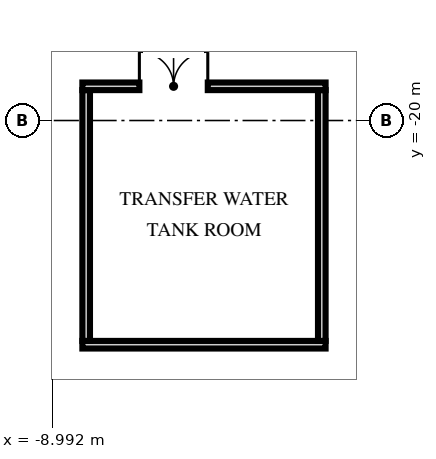
"""IFC4 building model, lengths in metres.
Left out: names, types, materials, properties, quantities, classifications, styles, units other than length and angle.
Written with IfcOpenShell. Run it as: python <this file> out.ifc"""

import sys

from ifc_helpers import new_model, si_unit, direction, frame, frame_2d, origin, origin_2d, place, context, subcontext, project, spatial, rectangle, hollow_rectangle, extrude, element, fill, save


model = new_model("IFC4")
c1 = context("Model", 3, precision=1e-05, world=origin(), true_north=direction((0.0, 1.0)))
c2 = subcontext(c1, "Body", "Model", "MODEL_VIEW")
j1 = project(units=[si_unit("LENGTHUNIT", "METRE"), si_unit("PLANEANGLEUNIT", "RADIAN")], contexts=[c1])
p1 = place(None, origin())
s1 = spatial("IfcSite", under=j1, at=p1, CompositionType="ELEMENT")
p2 = place(p1, origin())
s2 = spatial("IfcBuilding", under=s1, at=p2, CompositionType="ELEMENT")
p3 = place(p2, frame((0.0, 0.0, 99.75)))
s3 = spatial("IfcBuildingStorey", under=s2, at=p3, CompositionType="ELEMENT", Elevation=99.75)
p4 = place(p3, frame((0.0, -29.8, -0.65), z_axis=(0.0, 0.334765406017, 0.942301503201), x_axis=(1.0, 0.0, 0.0)))
e1 = element("IfcColumn", 1, at=p4, inside=s3, PredefinedType="COLUMN", context=c2, shape_type="SweptSolid", body=[
    extrude(hollow_rectangle(XDim=3.2, YDim=1.8, WallThickness=0.2, at=origin_2d()), origin(), (0.0, 0.0, 1.0), 8.065),
])
p5 = place(p3, frame((-10.0, -29.8, -0.65), z_axis=(0.103601510687, 0.332963994967, 0.937230870724), x_axis=(0.994618884766, -0.034712905596, -0.097612951251)))
e2 = element("IfcColumn", 2, at=p5, inside=s3, PredefinedType="COLUMN", context=c2, shape_type="SweptSolid", body=[
    extrude(hollow_rectangle(XDim=3.2, YDim=1.8, WallThickness=0.2, at=origin_2d()), origin(), (0.0, 0.0, 1.0), 8.109),
])
p6 = place(p3, frame((-8.2, -25.9, 0.0), z_axis=(0.0, 0.0, 1.0), x_axis=(1.0, 0.0, 0.0)))
e3 = element("IfcWall", 3, at=p6, inside=s3, PredefinedType="SOLIDWALL", context=c2, shape_type="SweptSolid", body=[
    extrude(rectangle(XDim=6.4, YDim=0.2, at=frame_2d((3.2, 0.0))), origin(), (0.0, 0.0, 1.0), 6.46),
])
for number, where, z_axis, x_axis in (
    (4, (-8.1, -25.8, 0.0), (0.0, 0.0, 1.0), (0.0, 1.0, 0.0)),
    (5, (-1.9, -25.8, 0.0), (0.0, 0.0, 1.0), (0.0, 1.0, 0.0)),
):
    element("IfcWall", number, at=place(p3, frame(where, z_axis=z_axis, x_axis=x_axis)), inside=s3, PredefinedType="SOLIDWALL", context=c2, shape_type="SweptSolid", body=[
        extrude(rectangle(XDim=6.6, YDim=0.2, at=frame_2d((3.3, 0.0))), origin(), (0.0, 0.0, 1.0), 7.25),
    ])
p7 = place(p3, frame((-8.2, -19.1, 0.0), z_axis=(0.0, 0.0, 1.0), x_axis=(1.0, 0.0, 0.0)))
e6 = element("IfcWall", 6, at=p7, inside=s3, PredefinedType="SOLIDWALL", context=c2, shape_type="SweptSolid", body=[
    extrude(rectangle(XDim=6.4, YDim=0.2, at=frame_2d((3.2, 0.0))), origin(), (0.0, 0.0, 1.0), 6.46),
])
p8 = place(p7, frame((1.5, 0.0, 0.0)))
e7 = element("IfcOpeningElement", 7, at=p8, cuts=e6, PredefinedType="OPENING", context=c2, shape_type="SweptSolid", body=[
    extrude(rectangle(XDim=1.8, YDim=2.4, at=frame_2d((0.9, 1.2))), frame((0.0, 0.11, 0.0), z_axis=(0.0, -1.0, 0.0), x_axis=(1.0, 0.0, 0.0)), (0.0, 0.0, 1.0), 0.22),
])
p9 = place(p8, origin())
e8 = element("IfcDoor", 8, at=p9, inside=s3, OperationType="DOUBLE_DOOR_SINGLE_SWING", PredefinedType="DOOR", context=c2, shape_type="SweptSolid", body=[
    extrude(rectangle(XDim=1.8, YDim=2.4, at=frame_2d((0.9, 1.2))), frame((0.0, 0.025, 0.0), z_axis=(0.0, -1.0, 0.0), x_axis=(1.0, 0.0, 0.0)), (0.0, 0.0, 1.0), 0.05),
])
fill(e7, e8)
save(model, sys.argv[1])
